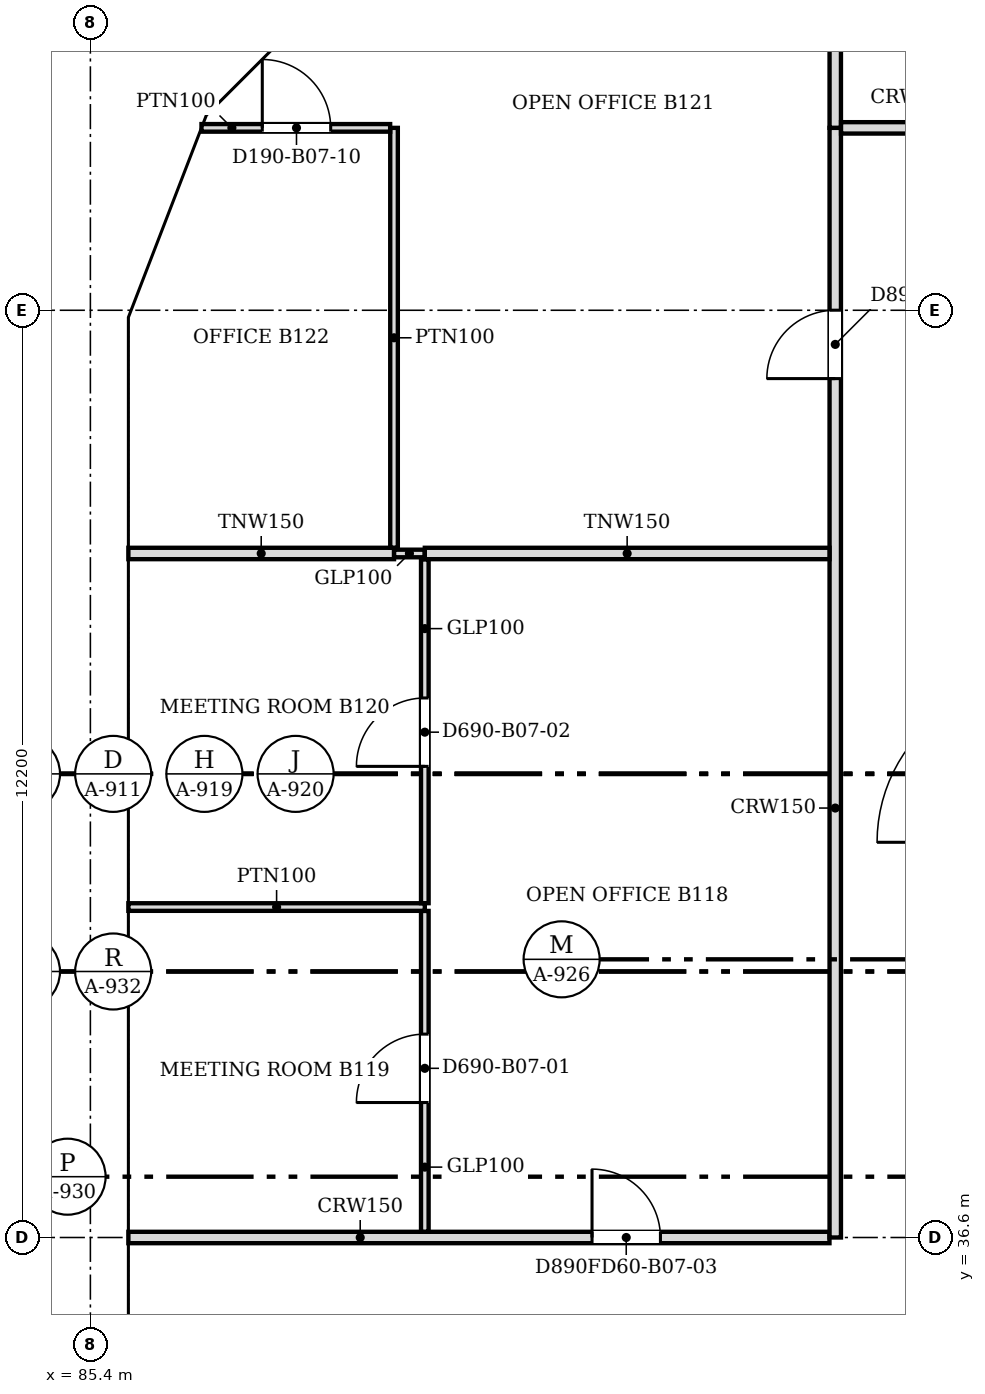
"""IFC4 building model, lengths in metres.
Left out: names, types, materials, properties, quantities, classifications, styles, units other than length and angle.
Written with IfcOpenShell. Run it as: python <this file> out.ifc"""

import sys

from ifc_helpers import new_model, si_unit, direction, frame, frame_2d, origin, place, context, subcontext, project, spatial, polyline, rectangle, outline, extrude, faceted_brep, source, transform, mapped, element, fill, save


model = new_model("IFC4")
c1 = context("Model", 3, precision=1e-05, world=origin(), true_north=direction((0.0, 1.0)))
c2 = subcontext(c1, "Body", "Model", "MODEL_VIEW")
j1 = project(units=[si_unit("LENGTHUNIT", "METRE"), si_unit("PLANEANGLEUNIT", "RADIAN")], contexts=[c1])
p1 = place(None, origin())
s1 = spatial("IfcSite", under=j1, at=p1, CompositionType="ELEMENT")
p2 = place(p1, origin())
s2 = spatial("IfcBuilding", under=s1, at=p2, CompositionType="ELEMENT")
p3 = place(p2, frame((0.0, 0.0, 68.6)))
s3 = spatial("IfcBuildingStorey", under=s2, at=p3, CompositionType="ELEMENT", Elevation=68.6)
m1 = source(origin(), c2, "Body", "Brep", [
    faceted_brep([(2.997, -0.25, 3.732), (2.944, -0.25, 3.8), (0.0, -0.25, 0.0), (2.997, -0.25, 0.0), (0.053, 0.25, 0.068), (2.891, 0.25, 3.732), (2.891, 0.25, 0.0), (0.053, 0.25, 0.0), (2.944, 0.0, 3.8), (0.0, 0.0, 0.0)], [[[0, 1, 2, 3]], [[4, 5, 6, 7]], [[8, 1, 0]], [[5, 4, 9, 2, 1, 8]], [[7, 6, 3, 2, 9]], [[7, 9, 4]], [[3, 6, 5, 8, 0]]]),
])
p4 = place(p3, frame((88.794, 53.588, 0.0), z_axis=(0.0, 0.0, 1.0), x_axis=(-0.707066050402, -0.707147509625, 0.0)))
e1 = element("IfcWall", 1, at=p4, inside=s3, PredefinedType="SOLIDWALL", context=c2, shape_type="MappedRepresentation", body=[
    mapped(m1, transform((0.0, 0.0, 0.0), scale=1.0)),
])
m2 = source(origin(), c2, "Body", "SweptSolid", [
    extrude(outline(polyline([(2.744, 3.134), (0.51, 0.25), (2.744, 0.25), (2.744, 3.134)])), frame((0.0, 0.26, 0.0), z_axis=(0.0, -1.0, 0.0), x_axis=(1.0, 0.0, 0.0)), (0.0, 0.0, 1.0), 0.52),
])
p5 = place(p4, origin())
e2 = element("IfcOpeningElement", 2, at=p5, cuts=e1, PredefinedType="OPENING", context=c2, shape_type="MappedRepresentation", body=[
    mapped(m2, transform((0.0, 0.0, 0.0), scale=1.0)),
])
m3 = source(origin(), c2, "Body", "Brep", [
    faceted_brep([(3.003, -0.25, 0.0), (0.053, -0.25, 3.8), (0.0, -0.25, 3.731), (0.0, -0.25, 0.0), (0.106, 0.25, 3.732), (2.957, 0.25, 0.06), (2.957, 0.25, 0.0), (0.106, 0.25, 0.0), (0.053, 0.0, 3.8), (3.003, 0.0, 0.0)], [[[0, 1, 2, 3]], [[4, 5, 6, 7]], [[5, 4, 8, 1, 0, 9]], [[2, 1, 8]], [[7, 6, 9, 0, 3]], [[7, 3, 2, 8, 4]], [[9, 6, 5]]]),
])
p6 = place(p3, frame((86.731, 51.556, 0.0), z_axis=(0.0, 0.0, 1.0), x_axis=(-0.359855894603, -0.933007896601, 0.0)))
e3 = element("IfcWall", 3, at=p6, inside=s3, PredefinedType="SOLIDWALL", context=c2, shape_type="MappedRepresentation", body=[
    mapped(m3, transform((0.0, 0.0, 0.0), scale=1.0)),
])
m4 = source(origin(), c2, "Body", "SweptSolid", [
    extrude(outline(polyline([(2.493, 0.25), (0.253, 3.135), (0.253, 0.25), (2.493, 0.25)])), frame((0.0, 0.26, 0.0), z_axis=(0.0, -1.0, 0.0), x_axis=(1.0, 0.0, 0.0)), (0.0, 0.0, 1.0), 0.52),
])
p7 = place(p6, origin())
e4 = element("IfcOpeningElement", 4, at=p7, cuts=e3, PredefinedType="OPENING", context=c2, shape_type="MappedRepresentation", body=[
    mapped(m4, transform((0.0, 0.0, 0.0), scale=1.0)),
])
m5 = source(origin(), c2, "Body", "Brep", [
    faceted_brep([(6.053, -0.25, 0.0), (3.003, -0.25, 3.8), (0.0, -0.25, 0.0), (0.047, 0.25, 0.059), (3.003, 0.25, 3.8), (6.053, 0.25, 0.0), (0.047, 0.25, 0.0), (0.0, 0.0, 0.0)], [[[0, 1, 2]], [[3, 4, 5, 6]], [[5, 4, 1, 0]], [[4, 3, 7, 2, 1]], [[6, 5, 0, 2, 7]], [[6, 7, 3]]]),
])
p8 = place(p3, frame((85.65, 48.753, 0.0), z_axis=(0.0, 0.0, 1.0), x_axis=(0.0, -1.0, 0.0)))
e5 = element("IfcWall", 5, at=p8, inside=s3, PredefinedType="SOLIDWALL", context=c2, shape_type="MappedRepresentation", body=[
    mapped(m5, transform((0.0, 0.0, 0.0), scale=1.0)),
])
m6 = source(origin(), c2, "Body", "SweptSolid", [
    extrude(outline(polyline([(5.532, 0.25), (3.005, 3.399), (0.516, 0.25), (5.532, 0.25)])), frame((0.0, 0.26, 0.0), z_axis=(0.0, -1.0, 0.0), x_axis=(1.0, 0.0, 0.0)), (0.0, 0.0, 1.0), 0.52),
])
p9 = place(p8, origin())
e6 = element("IfcOpeningElement", 6, at=p9, cuts=e5, PredefinedType="OPENING", context=c2, shape_type="MappedRepresentation", body=[
    mapped(m6, transform((0.0, 0.0, 0.0), scale=1.0)),
])
m7 = source(origin(), c2, "Body", "Brep", [
    faceted_brep([(6.1, -0.25, 0.0), (3.05, -0.25, 3.8), (0.0, -0.25, 0.0), (6.1, -0.25, 0.0), (0.0, 0.25, 0.0), (3.05, 0.25, 3.8), (6.1, 0.25, 0.0), (6.1, 0.25, 0.0)], [[[0, 1, 2, 3]], [[4, 5, 6, 7]], [[6, 5, 1, 0]], [[5, 4, 2, 1]], [[4, 7, 3, 2]], [[3, 7, 6, 0]]]),
])
p10 = place(p3, frame((85.65, 42.7, 0.0), z_axis=(0.0, 0.0, 1.0), x_axis=(0.0, -1.0, 0.0)))
e7 = element("IfcWall", 7, at=p10, inside=s3, PredefinedType="SOLIDWALL", context=c2, shape_type="MappedRepresentation", body=[
    mapped(m7, transform((0.0, 0.0, 0.0), scale=1.0)),
])
m8 = source(origin(), c2, "Body", "SweptSolid", [
    extrude(outline(polyline([(5.579, 0.25), (3.05, 3.4), (0.521, 0.25), (5.579, 0.25)])), frame((0.0, 0.26, 0.0), z_axis=(0.0, -1.0, 0.0), x_axis=(1.0, 0.0, 0.0)), (0.0, 0.0, 1.0), 0.52),
])
p11 = place(p10, origin())
e8 = element("IfcOpeningElement", 8, at=p11, cuts=e7, PredefinedType="OPENING", context=c2, shape_type="MappedRepresentation", body=[
    mapped(m8, transform((0.0, 0.0, 0.0), scale=1.0)),
])
m9 = source(origin(), c2, "Body", "SweptSolid", [
    extrude(outline(polyline([(6.1, 0.0), (3.05, 3.8), (0.0, 0.0), (6.1, 0.0)])), frame((0.0, 0.25, 0.0), z_axis=(0.0, -1.0, 0.0), x_axis=(1.0, 0.0, 0.0)), (0.0, 0.0, 1.0), 0.5),
])
p12 = place(p3, frame((85.65, 36.6, 0.0), z_axis=(0.0, 0.0, 1.0), x_axis=(0.0, -1.0, 0.0)))
e9 = element("IfcWall", 9, at=p12, inside=s3, PredefinedType="SOLIDWALL", context=c2, shape_type="MappedRepresentation", body=[
    mapped(m9, transform((0.0, 0.0, 0.0), scale=1.0)),
])
p13 = place(p12, origin())
e10 = element("IfcOpeningElement", 10, at=p13, cuts=e9, PredefinedType="OPENING", context=c2, shape_type="MappedRepresentation", body=[
    mapped(m8, transform((0.0, 0.0, 0.0), scale=1.0)),
])
p14 = place(p2, frame((0.0, 0.0, 72.4)))
s4 = spatial("IfcBuildingStorey", under=s2, at=p14, CompositionType="ELEMENT", Elevation=72.4)
m10 = source(origin(), c2, "Body", "Brep", [
    faceted_brep([(0.053, -0.25, 0.0), (2.997, -0.25, 3.8), (0.053, -0.25, 7.6), (0.0, -0.25, 7.532), (0.0, -0.25, 0.068), (0.106, 0.25, 7.531), (2.944, 0.25, 3.868), (2.944, 0.25, 3.732), (0.106, 0.25, 0.068), (2.997, 0.0, 3.8), (0.053, 0.0, 0.0), (0.053, 0.0, 7.6)], [[[0, 1, 2, 3, 4]], [[5, 6, 7, 8]], [[8, 7, 9, 1, 0, 10]], [[6, 5, 11, 2, 1, 9]], [[3, 2, 11]], [[10, 0, 4]], [[8, 10, 4, 3, 11, 5]], [[9, 7, 6]]]),
])
p15 = place(p14, frame((88.831, 53.625, -3.8), z_axis=(0.0, 0.0, 1.0), x_axis=(-0.707147509625, -0.707066050402, 0.0)))
e11 = element("IfcWall", 11, at=p15, inside=s4, PredefinedType="SOLIDWALL", context=c2, shape_type="MappedRepresentation", body=[
    mapped(m10, transform((0.0, 0.0, 0.0), scale=1.0)),
])
m11 = source(origin(), c2, "Body", "SweptSolid", [
    extrude(outline(polyline([(0.253, 0.666), (2.681, 3.8), (0.253, 6.934), (0.253, 0.666)])), frame((0.0, 0.26, 0.0), z_axis=(0.0, -1.0, 0.0), x_axis=(1.0, 0.0, 0.0)), (0.0, 0.0, 1.0), 0.52),
])
p16 = place(p15, origin())
e12 = element("IfcOpeningElement", 12, at=p16, cuts=e11, PredefinedType="OPENING", context=c2, shape_type="MappedRepresentation", body=[
    mapped(m11, transform((0.0, 0.0, 0.0), scale=1.0)),
])
m12 = source(origin(), c2, "Body", "Brep", [
    faceted_brep([(2.95, -0.25, 0.0), (2.997, -0.25, 0.059), (2.997, -0.25, 7.541), (2.95, -0.25, 7.6), (0.0, -0.25, 3.8), (0.053, 0.25, 3.868), (2.904, 0.25, 7.54), (2.904, 0.25, 0.06), (0.053, 0.25, 3.732), (2.95, 0.0, 0.0), (2.95, 0.0, 7.6), (0.0, 0.0, 3.8)], [[[0, 1, 2, 3, 4]], [[5, 6, 7, 8]], [[1, 0, 9]], [[10, 3, 2]], [[6, 5, 11, 4, 3, 10]], [[8, 7, 9, 0, 4, 11]], [[8, 11, 5]], [[1, 9, 7, 6, 10, 2]]]),
])
p17 = place(p14, frame((86.712, 51.506, -3.8), z_axis=(0.0, 0.0, 1.0), x_axis=(-0.359874094142, -0.933000876937, 0.0)))
e13 = element("IfcWall", 13, at=p17, inside=s4, PredefinedType="SOLIDWALL", context=c2, shape_type="MappedRepresentation", body=[
    mapped(m12, transform((0.0, 0.0, 0.0), scale=1.0)),
])
m13 = source(origin(), c2, "Body", "SweptSolid", [
    extrude(outline(polyline([(2.75, 6.935), (0.316, 3.8), (2.75, 0.665), (2.75, 6.935)])), frame((0.0, 0.26, 0.0), z_axis=(0.0, -1.0, 0.0), x_axis=(1.0, 0.0, 0.0)), (0.0, 0.0, 1.0), 0.52),
])
p18 = place(p17, origin())
e14 = element("IfcOpeningElement", 14, at=p18, cuts=e13, PredefinedType="OPENING", context=c2, shape_type="MappedRepresentation", body=[
    mapped(m13, transform((0.0, 0.0, 0.0), scale=1.0)),
])
m14 = source(origin(), c2, "Body", "Brep", [
    faceted_brep([(0.047, -0.25, 0.0), (3.05, -0.25, 3.8), (0.047, -0.25, 7.6), (0.0, -0.25, 7.54), (0.0, -0.25, 0.06), (0.093, 0.25, 7.541), (3.05, 0.25, 3.8), (0.093, 0.25, 0.059), (0.047, 0.0, 0.0), (0.047, 0.0, 7.6)], [[[0, 1, 2, 3, 4]], [[5, 6, 7]], [[7, 6, 1, 0, 8]], [[6, 5, 9, 2, 1]], [[3, 2, 9]], [[8, 0, 4]], [[7, 8, 4, 3, 9, 5]]]),
])
p19 = place(p14, frame((85.65, 48.8, -3.8), z_axis=(0.0, 0.0, 1.0), x_axis=(0.0, -1.0, 0.0)))
e15 = element("IfcWall", 15, at=p19, inside=s4, PredefinedType="SOLIDWALL", context=c2, shape_type="MappedRepresentation", body=[
    mapped(m14, transform((0.0, 0.0, 0.0), scale=1.0)),
])
m15 = source(origin(), c2, "Body", "SweptSolid", [
    extrude(outline(polyline([(0.247, 0.656), (2.731, 3.8), (0.247, 6.944), (0.247, 0.656)])), frame((0.0, 0.26, 0.0), z_axis=(0.0, -1.0, 0.0), x_axis=(1.0, 0.0, 0.0)), (0.0, 0.0, 1.0), 0.52),
])
p20 = place(p19, origin())
e16 = element("IfcOpeningElement", 16, at=p20, cuts=e15, PredefinedType="OPENING", context=c2, shape_type="MappedRepresentation", body=[
    mapped(m15, transform((0.0, 0.0, 0.0), scale=1.0)),
])
m16 = source(origin(), c2, "Body", "SweptSolid", [
    extrude(outline(polyline([(3.05, 0.0), (6.1, 3.8), (3.05, 7.6), (0.0, 3.8), (3.05, 0.0)])), frame((0.0, 0.25, 0.0), z_axis=(0.0, -1.0, 0.0), x_axis=(1.0, 0.0, 0.0)), (0.0, 0.0, 1.0), 0.5),
])
p21 = place(p14, frame((85.65, 45.75, -3.8), z_axis=(0.0, 0.0, 1.0), x_axis=(0.0, -1.0, 0.0)))
e17 = element("IfcWall", 17, at=p21, inside=s4, PredefinedType="SOLIDWALL", context=c2, shape_type="MappedRepresentation", body=[
    mapped(m16, transform((0.0, 0.0, 0.0), scale=1.0)),
])
m17 = source(origin(), c2, "Body", "SweptSolid", [
    extrude(outline(polyline([(3.05, 0.399), (5.78, 3.8), (3.05, 7.2), (0.321, 3.8), (3.05, 0.399)])), frame((0.0, 0.26, 0.0), z_axis=(0.0, -1.0, 0.0), x_axis=(1.0, 0.0, 0.0)), (0.0, 0.0, 1.0), 0.52),
])
p22 = place(p21, origin())
e18 = element("IfcOpeningElement", 18, at=p22, cuts=e17, PredefinedType="OPENING", context=c2, shape_type="MappedRepresentation", body=[
    mapped(m17, transform((0.0, 0.0, 0.0), scale=1.0)),
])
m18 = source(origin(), c2, "Body", "Brep", [
    faceted_brep([(3.05, -0.25, 0.0), (6.1, -0.25, 3.8), (6.1, -0.25, 3.8), (3.05, -0.25, 7.6), (0.0, -0.25, 3.8), (0.0, 0.25, 3.8), (3.05, 0.25, 7.6), (6.1, 0.25, 3.8), (6.1, 0.25, 3.8), (3.05, 0.25, 0.0)], [[[0, 1, 2, 3, 4]], [[5, 6, 7, 8, 9]], [[9, 8, 1, 0]], [[7, 6, 3, 2]], [[6, 5, 4, 3]], [[5, 9, 0, 4]], [[1, 8, 7, 2]]]),
])
p23 = place(p14, frame((85.65, 39.65, -3.8), z_axis=(0.0, 0.0, 1.0), x_axis=(0.0, -1.0, 0.0)))
e19 = element("IfcWall", 19, at=p23, inside=s4, PredefinedType="SOLIDWALL", context=c2, shape_type="MappedRepresentation", body=[
    mapped(m18, transform((0.0, 0.0, 0.0), scale=1.0)),
])
p24 = place(p23, origin())
e20 = element("IfcOpeningElement", 20, at=p24, cuts=e19, PredefinedType="OPENING", context=c2, shape_type="MappedRepresentation", body=[
    mapped(m17, transform((0.0, 0.0, 0.0), scale=1.0)),
])
p25 = place(p3, frame((85.9, 36.6, 0.0), z_axis=(0.0, 0.0, 1.0), x_axis=(1.0, 0.0, 0.0)))
e21 = element("IfcWall", 21, at=p25, inside=s3, PredefinedType="PARTITIONING", context=c2, shape_type="SweptSolid", body=[
    extrude(rectangle(XDim=9.224, YDim=0.15, at=frame_2d((4.612, 0.0))), origin(), (0.0, 0.0, 1.0), 3.067),
])
m19 = source(origin(), c2, "Body", "SweptSolid", [
    extrude(rectangle(XDim=0.9, YDim=2.1, at=frame_2d((0.45, 1.05))), frame((0.0, 0.085, 0.0), z_axis=(0.0, -1.0, 0.0), x_axis=(1.0, 0.0, 0.0)), (0.0, 0.0, 1.0), 0.17),
])
p26 = place(p25, frame((6.1, 0.0, 0.0)))
e22 = element("IfcOpeningElement", 22, at=p26, cuts=e21, PredefinedType="OPENING", context=c2, shape_type="MappedRepresentation", body=[
    mapped(m19, transform((0.0, 0.0, 0.0), scale=1.0)),
])
p27 = place(p3, frame((95.2, 36.6, 0.0), z_axis=(0.0, 0.0, 1.0), x_axis=(0.0, 1.0, 0.0)))
e23 = element("IfcWall", 23, at=p27, inside=s3, PredefinedType="PARTITIONING", context=c2, shape_type="SweptSolid", body=[
    extrude(rectangle(XDim=14.6, YDim=0.15, at=frame_2d((7.3, 0.0))), origin(), (0.0, 0.0, 1.0), 3.067),
])
p28 = place(p27, frame((11.301, 0.0, 0.0)))
e24 = element("IfcOpeningElement", 24, at=p28, cuts=e23, PredefinedType="OPENING", context=c2, shape_type="MappedRepresentation", body=[
    mapped(m19, transform((0.0, 0.0, 0.0), scale=1.0)),
])
p29 = place(p3, frame((89.8, 36.676, 0.0), z_axis=(0.0, 0.0, 1.0), x_axis=(0.0, 1.0, 0.0)))
e25 = element("IfcWall", 25, at=p29, inside=s3, PredefinedType="PARTITIONING", context=c2, shape_type="SweptSolid", body=[
    extrude(rectangle(XDim=4.221, YDim=0.1, at=frame_2d((2.11, 0.0))), origin(), (0.0, 0.0, 1.0), 3.067),
])
m20 = source(origin(), c2, "Body", "SweptSolid", [
    extrude(rectangle(XDim=0.9, YDim=2.1, at=frame_2d((0.45, 1.05))), frame((0.0, 0.06, 0.0), z_axis=(0.0, -1.0, 0.0), x_axis=(1.0, 0.0, 0.0)), (0.0, 0.0, 1.0), 0.12),
])
p30 = place(p29, frame((1.7, 0.0, 0.0)))
e26 = element("IfcOpeningElement", 26, at=p30, cuts=e25, PredefinedType="OPENING", context=c2, shape_type="MappedRepresentation", body=[
    mapped(m20, transform((0.0, 0.0, 0.0), scale=1.0)),
])
p31 = place(p3, frame((85.9, 40.948, 0.0), z_axis=(0.0, 0.0, 1.0), x_axis=(1.0, 0.0, 0.0)))
e27 = element("IfcWall", 27, at=p31, inside=s3, PredefinedType="PARTITIONING", context=c2, shape_type="SweptSolid", body=[
    extrude(rectangle(XDim=3.9, YDim=0.1, at=frame_2d((1.95, 0.0))), origin(), (0.0, 0.0, 1.0), 3.067),
])
p32 = place(p3, frame((89.8, 40.999, 0.0), z_axis=(0.0, 0.0, 1.0), x_axis=(0.0, 1.0, 0.0)))
e28 = element("IfcWall", 28, at=p32, inside=s3, PredefinedType="PARTITIONING", context=c2, shape_type="SweptSolid", body=[
    extrude(rectangle(XDim=4.525, YDim=0.1, at=frame_2d((2.263, 0.0))), origin(), (0.0, 0.0, 1.0), 3.067),
])
p33 = place(p32, frame((1.8, 0.0, 0.0)))
e29 = element("IfcOpeningElement", 29, at=p33, cuts=e28, PredefinedType="OPENING", context=c2, shape_type="MappedRepresentation", body=[
    mapped(m20, transform((0.0, 0.0, 0.0), scale=1.0)),
])
p34 = place(p3, frame((85.9, 45.6, 0.0), z_axis=(0.0, 0.0, 1.0), x_axis=(1.0, 0.0, 0.0)))
e30 = element("IfcWall", 30, at=p34, inside=s3, PredefinedType="PARTITIONING", context=c2, shape_type="SweptSolid", body=[
    extrude(rectangle(XDim=3.495, YDim=0.15, at=frame_2d((1.748, 0.0))), origin(), (0.0, 0.0, 1.0), 3.067),
])
p35 = place(p3, frame((89.396, 45.6, 0.0), z_axis=(0.0, 0.0, 1.0), x_axis=(1.0, 0.0, 0.0)))
e31 = element("IfcWall", 31, at=p35, inside=s3, PredefinedType="PARTITIONING", context=c2, shape_type="SweptSolid", body=[
    extrude(rectangle(XDim=0.403, YDim=0.1, at=frame_2d((0.202, 0.0))), origin(), (0.0, 0.0, 1.0), 3.067),
])
p36 = place(p3, frame((89.8, 45.6, 0.0), z_axis=(0.0, 0.0, 1.0), x_axis=(1.0, 0.0, 0.0)))
e32 = element("IfcWall", 32, at=p36, inside=s3, PredefinedType="PARTITIONING", context=c2, shape_type="SweptSolid", body=[
    extrude(rectangle(XDim=5.324, YDim=0.15, at=frame_2d((2.662, 0.0))), origin(), (0.0, 0.0, 1.0), 3.067),
])
p37 = place(p3, frame((89.395, 45.676, 0.0), z_axis=(0.0, 0.0, 1.0), x_axis=(0.0, 1.0, 0.0)))
e33 = element("IfcWall", 33, at=p37, inside=s3, PredefinedType="PARTITIONING", context=c2, shape_type="SweptSolid", body=[
    extrude(rectangle(XDim=5.524, YDim=0.1, at=frame_2d((2.762, 0.0))), origin(), (0.0, 0.0, 1.0), 3.067),
])
p38 = place(p3, frame((89.344, 51.2, 0.0), z_axis=(0.0, 0.0, 1.0), x_axis=(-1.0, 0.0, 0.0)))
e34 = element("IfcWall", 34, at=p38, inside=s3, PredefinedType="PARTITIONING", context=c2, shape_type="SweptSolid", body=[
    extrude(rectangle(XDim=2.482, YDim=0.1, at=frame_2d((1.241, 0.0))), origin(), (0.0, 0.0, 1.0), 3.067),
])
p39 = place(p38, frame((0.782, 0.0, 0.0)))
e35 = element("IfcOpeningElement", 35, at=p39, cuts=e34, PredefinedType="OPENING", context=c2, shape_type="MappedRepresentation", body=[
    mapped(m20, transform((0.0, 0.0, 0.0), scale=1.0)),
])
p40 = place(p3, frame((95.2, 51.201, 0.0), z_axis=(0.0, 0.0, 1.0), x_axis=(0.0, 1.0, 0.0)))
e36 = element("IfcWall", 36, at=p40, inside=s3, PredefinedType="PARTITIONING", context=c2, shape_type="SweptSolid", body=[
    extrude(rectangle(XDim=3.199, YDim=0.15, at=frame_2d((1.6, 0.0))), origin(), (0.0, 0.0, 1.0), 3.067),
])
p41 = place(p3, frame((95.276, 51.2, 0.0), z_axis=(0.0, 0.0, 1.0), x_axis=(1.0, 0.0, 0.0)))
e37 = element("IfcWall", 37, at=p41, inside=s3, PredefinedType="PARTITIONING", context=c2, shape_type="SweptSolid", body=[
    extrude(rectangle(XDim=4.724, YDim=0.15, at=frame_2d((2.362, 0.0))), origin(), (0.0, 0.0, 1.0), 3.067),
])
m21 = source(origin(), c2, "Body", "SweptSolid", [
    extrude(rectangle(XDim=1.0, YDim=2.1, at=frame_2d((0.5, 1.05))), frame((0.0, 0.085, 0.0), z_axis=(0.0, -1.0, 0.0), x_axis=(1.0, 0.0, 0.0)), (0.0, 0.0, 1.0), 0.17),
])
p42 = place(p41, frame((1.9, 0.0, 0.0)))
e38 = element("IfcOpeningElement", 38, at=p42, cuts=e37, PredefinedType="OPENING", context=c2, shape_type="MappedRepresentation", body=[
    mapped(m21, transform((0.0, 0.0, 0.0), scale=1.0)),
])
m22 = source(origin(), c2, "Body", "SweptSolid", [
    extrude(rectangle(XDim=0.9, YDim=2.1, at=frame_2d((0.45, 1.05))), frame((0.0, 0.025, 0.0), z_axis=(0.0, -1.0, 0.0), x_axis=(1.0, 0.0, 0.0)), (0.0, 0.0, 1.0), 0.05),
])
p43 = place(p30, origin())
e39 = element("IfcDoor", 39, at=p43, inside=s3, OperationType="SINGLE_SWING_LEFT", PredefinedType="DOOR", context=c2, shape_type="MappedRepresentation", body=[
    mapped(m22, transform((0.0, 0.0, 0.0), scale=1.0)),
])
fill(e26, e39)
p44 = place(p33, origin())
e40 = element("IfcDoor", 40, at=p44, inside=s3, OperationType="SINGLE_SWING_LEFT", PredefinedType="DOOR", context=c2, shape_type="MappedRepresentation", body=[
    mapped(m22, transform((0.0, 0.0, 0.0), scale=1.0)),
])
fill(e29, e40)
p45 = place(p28, origin())
e41 = element("IfcDoor", 41, at=p45, inside=s3, OperationType="SINGLE_SWING_LEFT", PredefinedType="DOOR", context=c2, shape_type="MappedRepresentation", body=[
    mapped(m22, transform((0.0, 0.0, 0.0), scale=1.0)),
])
fill(e24, e41)
p46 = place(p39, origin())
e42 = element("IfcDoor", 42, at=p46, inside=s3, OperationType="SINGLE_SWING_RIGHT", PredefinedType="DOOR", context=c2, shape_type="MappedRepresentation", body=[
    mapped(m22, transform((0.0, 0.0, 0.0), scale=1.0)),
])
fill(e35, e42)
p47 = place(p26, origin())
e43 = element("IfcDoor", 43, at=p47, inside=s3, OperationType="SINGLE_SWING_LEFT", PredefinedType="DOOR", context=c2, shape_type="MappedRepresentation", body=[
    mapped(m22, transform((0.0, 0.0, 0.0), scale=1.0)),
])
fill(e22, e43)
save(model, sys.argv[1])
